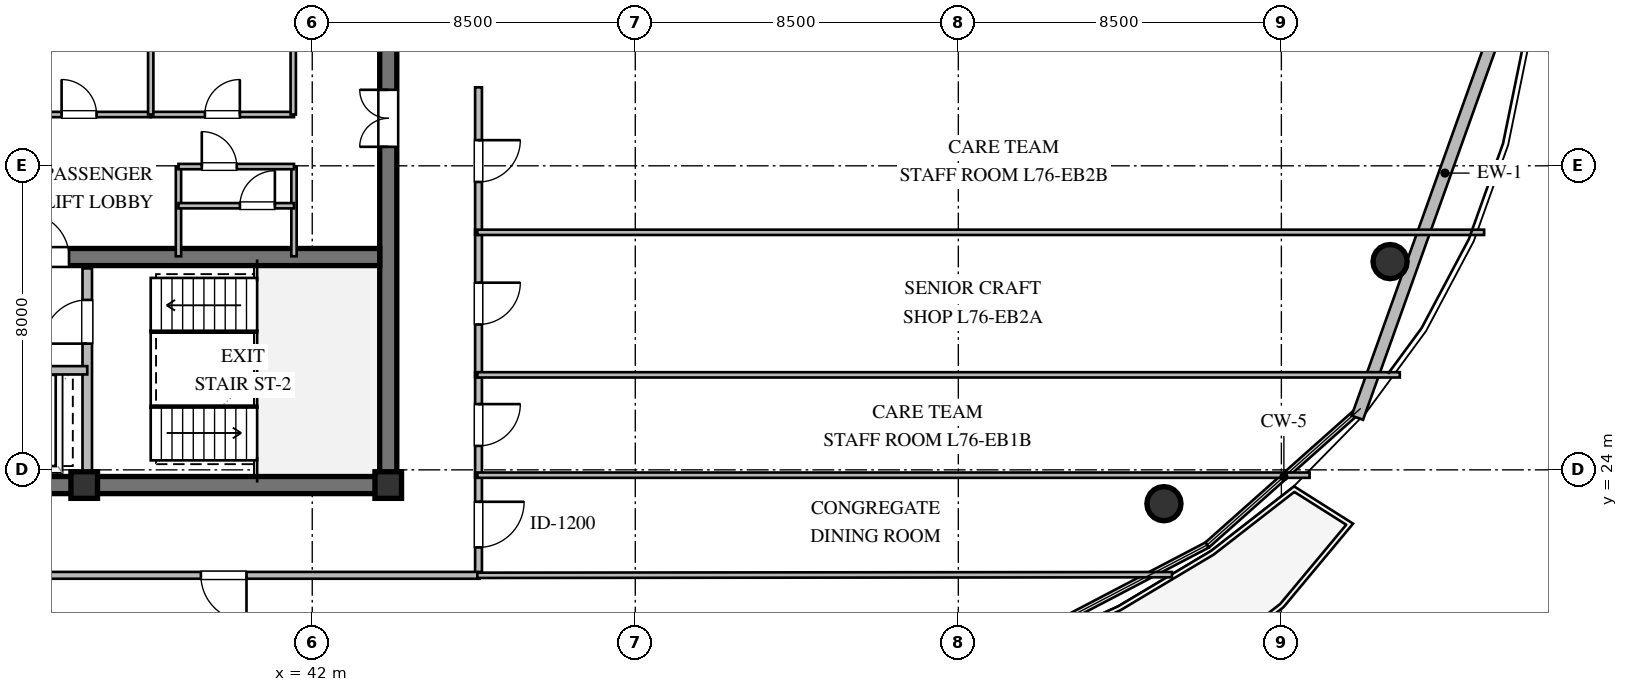
"""IFC4 building model, lengths in metres.
Left out: names, types, materials, properties, quantities, classifications, styles, units other than length and angle.
Written with IfcOpenShell. Run it as: python <this file> out.ifc"""

import sys

from ifc_helpers import new_model, si_unit, direction, frame, frame_2d, origin, origin_2d, place, context, subcontext, project, spatial, rectangle, circle, extrude, element, fill, save


model = new_model("IFC4")
c1 = context("Model", 3, precision=1e-05, world=origin(), true_north=direction((0.0, 1.0)))
c2 = subcontext(c1, "Body", "Model", "MODEL_VIEW")
j1 = project(units=[si_unit("LENGTHUNIT", "METRE"), si_unit("PLANEANGLEUNIT", "RADIAN")], contexts=[c1])
p1 = place(None, origin())
s1 = spatial("IfcSite", under=j1, at=p1, CompositionType="ELEMENT")
p2 = place(p1, origin())
s2 = spatial("IfcBuilding", under=s1, at=p2, CompositionType="ELEMENT")
p3 = place(p2, frame((0.0, 0.0, 289.0)))
s3 = spatial("IfcBuildingStorey", under=s2, at=p3, CompositionType="ELEMENT", Elevation=289.0)
p4 = place(p3, frame((21.775, 23.6, 0.0), z_axis=(0.0, 0.0, 1.0), x_axis=(1.0, 0.0, 0.0)))
e1 = element("IfcWall", 1, at=p4, inside=s3, PredefinedType="SHEAR", context=c2, shape_type="SweptSolid", body=[
    extrude(rectangle(XDim=22.45, YDim=0.45, at=frame_2d((11.225, 0.0))), origin(), (0.0, 0.0, 1.0), 3.48),
])
p5 = place(p3, frame((44.0, 23.825, 0.0), z_axis=(0.0, 0.0, 1.0), x_axis=(0.0, 1.0, 0.0)))
e2 = element("IfcWall", 2, at=p5, inside=s3, PredefinedType="SHEAR", context=c2, shape_type="SweptSolid", body=[
    extrude(rectangle(XDim=12.35, YDim=0.45, at=frame_2d((6.175, 0.0))), origin(), (0.0, 0.0, 1.0), 3.48),
])
p6 = place(p5, frame((8.675, 0.0, 0.0)))
e3 = element("IfcOpeningElement", 3, at=p6, cuts=e2, PredefinedType="OPENING", context=c2, shape_type="SweptSolid", body=[
    extrude(rectangle(XDim=1.5, YDim=2.15, at=frame_2d((0.75, 1.075))), frame((0.0, 0.235, 0.0), z_axis=(0.0, -1.0, 0.0), x_axis=(1.0, 0.0, 0.0)), (0.0, 0.0, 1.0), 0.47),
])
p7 = place(p3, frame((22.225, 29.6, 0.0), z_axis=(0.0, 0.0, 1.0), x_axis=(1.0, 0.0, 0.0)))
e4 = element("IfcWall", 4, at=p7, inside=s3, PredefinedType="SHEAR", context=c2, shape_type="SweptSolid", body=[
    extrude(rectangle(XDim=21.55, YDim=0.45, at=frame_2d((10.775, 0.0))), origin(), (0.0, 0.0, 1.0), 3.48),
])
p8 = place(p7, frame((12.225, 0.0, 0.0)))
e5 = element("IfcOpeningElement", 5, at=p8, cuts=e4, PredefinedType="OPENING", context=c2, shape_type="SweptSolid", body=[
    extrude(rectangle(XDim=1.15, YDim=2.1, at=frame_2d((0.575, 1.05))), frame((0.0, 0.235, 0.0), z_axis=(0.0, -1.0, 0.0), x_axis=(1.0, 0.0, 0.0)), (0.0, 0.0, 1.0), 0.47),
])
for number, where, z_axis, x_axis in (
    (6, (36.0, 23.6, 0.0), (0.0, 0.0, 1.0), (1.0, 0.0, 0.0)),
    (7, (44.0, 23.6, 0.0), (0.0, 0.0, 1.0), (1.0, 0.0, 0.0)),
):
    element("IfcColumn", number, at=place(p3, frame(where, z_axis=z_axis, x_axis=x_axis)), inside=s3, PredefinedType="COLUMN", context=c2, shape_type="SweptSolid", body=[
        extrude(rectangle(XDim=0.7, YDim=0.7, at=origin_2d()), origin(), (0.0, 0.0, 1.0), 3.8),
    ])
for number, where, z_axis, x_axis in (
    (8, (64.41, 23.11, 0.0), (0.0, 0.0, 1.0), (1.0, 0.0, 0.0)),
    (9, (70.36, 29.48, 0.0), (0.0, 0.0, 1.0), (1.0, 0.0, 0.0)),
):
    element("IfcColumn", number, at=place(p3, frame(where, z_axis=z_axis, x_axis=x_axis)), inside=s3, PredefinedType="COLUMN", context=c2, shape_type="SweptSolid", body=[
        extrude(circle(Radius=0.45, at=origin_2d()), origin(), (0.0, 0.0, 1.0), 3.8),
    ])
p9 = place(p3, frame((74.108, 38.245, 0.0), z_axis=(0.0, 0.0, 1.0), x_axis=(-0.337073777429, -0.941478235845, 0.0)))
e10 = element("IfcWall", 10, at=p9, inside=s3, PredefinedType="STANDARD", context=c2, shape_type="SweptSolid", body=[
    extrude(rectangle(XDim=13.673, YDim=0.32, at=frame_2d((6.837, 0.0))), origin(), (0.0, 0.0, 1.0), 3.48),
])
p10 = place(p3, frame((36.08, 23.9, 0.0), z_axis=(0.0, 0.0, 1.0), x_axis=(0.0, 1.0, 0.0)))
e11 = element("IfcWall", 11, at=p10, inside=s3, PredefinedType="SOLIDWALL", context=c2, shape_type="SweptSolid", body=[
    extrude(rectangle(XDim=5.4, YDim=0.25, at=frame_2d((2.7, 0.0))), origin(), (0.0, 0.0, 1.0), 3.48),
])
p11 = place(p10, frame((3.421, 0.0, 0.0)))
e12 = element("IfcOpeningElement", 12, at=p11, cuts=e11, PredefinedType="OPENING", context=c2, shape_type="SweptSolid", body=[
    extrude(rectangle(XDim=1.15, YDim=2.1, at=frame_2d((0.575, 1.05))), frame((0.0, 0.135, 0.0), z_axis=(0.0, -1.0, 0.0), x_axis=(1.0, 0.0, 0.0)), (0.0, 0.0, 1.0), 0.27),
])
p12 = place(p3, frame((29.92, 26.62, 0.0), z_axis=(0.0, 0.0, 1.0), x_axis=(1.0, 0.0, 0.0)))
e13 = element("IfcWall", 13, at=p12, inside=s3, PredefinedType="SOLIDWALL", context=c2, shape_type="SweptSolid", body=[
    extrude(rectangle(XDim=6.16, YDim=0.22, at=frame_2d((3.08, 0.0))), origin(), (0.0, 0.0, 1.0), 3.48),
])
p13 = place(p12, frame((0.99, 0.0, 0.0)))
e14 = element("IfcOpeningElement", 14, at=p13, cuts=e13, PredefinedType="OPENING", context=c2, shape_type="SweptSolid", body=[
    extrude(rectangle(XDim=1.1, YDim=2.1, at=frame_2d((0.55, 1.05))), frame((0.0, 0.12, 0.0), z_axis=(0.0, -1.0, 0.0), x_axis=(1.0, 0.0, 0.0)), (0.0, 0.0, 1.0), 0.24),
])
p14 = place(p12, frame((4.07, 0.0, 0.0)))
e15 = element("IfcOpeningElement", 15, at=p14, cuts=e13, PredefinedType="OPENING", context=c2, shape_type="SweptSolid", body=[
    extrude(rectangle(XDim=1.1, YDim=2.1, at=frame_2d((0.55, 1.05))), frame((0.0, 0.12, 0.0), z_axis=(0.0, -1.0, 0.0), x_axis=(1.0, 0.0, 0.0)), (0.0, 0.0, 1.0), 0.24),
])
p15 = place(p3, frame((33.98, 33.35, 0.0), z_axis=(0.0, 0.0, 1.0), x_axis=(1.0, 0.0, 0.0)))
e16 = element("IfcWall", 16, at=p15, inside=s3, PredefinedType="PARTITIONING", context=c2, shape_type="SweptSolid", body=[
    extrude(rectangle(XDim=3.77, YDim=0.14, at=frame_2d((1.885, 0.0))), origin(), (0.0, 0.0, 1.0), 3.48),
])
p16 = place(p15, frame((1.425, 0.0, 0.0)))
e17 = element("IfcOpeningElement", 17, at=p16, cuts=e16, PredefinedType="OPENING", context=c2, shape_type="SweptSolid", body=[
    extrude(rectangle(XDim=0.92, YDim=2.1, at=frame_2d((0.46, 1.05))), frame((0.0, 0.08, 0.0), z_axis=(0.0, -1.0, 0.0), x_axis=(1.0, 0.0, 0.0)), (0.0, 0.0, 1.0), 0.16),
])
p17 = place(p3, frame((37.75, 33.35, 0.0), z_axis=(0.0, 0.0, 1.0), x_axis=(1.0, 0.0, 0.0)))
e18 = element("IfcWall", 18, at=p17, inside=s3, PredefinedType="PARTITIONING", context=c2, shape_type="SweptSolid", body=[
    extrude(rectangle(XDim=3.77, YDim=0.14, at=frame_2d((1.885, 0.0))), origin(), (0.0, 0.0, 1.0), 3.48),
])
p18 = place(p17, frame((1.425, 0.0, 0.0)))
e19 = element("IfcOpeningElement", 19, at=p18, cuts=e18, PredefinedType="OPENING", context=c2, shape_type="SweptSolid", body=[
    extrude(rectangle(XDim=0.92, YDim=2.1, at=frame_2d((0.46, 1.05))), frame((0.0, 0.08, 0.0), z_axis=(0.0, -1.0, 0.0), x_axis=(1.0, 0.0, 0.0)), (0.0, 0.0, 1.0), 0.16),
])
for number, where, z_axis, x_axis in (
    (20, (37.75, 33.35, 0.0), (0.0, 0.0, 1.0), (0.0, 1.0, 0.0)),
    (21, (41.5, 33.35, 0.0), (0.0, 0.0, 1.0), (0.0, 1.0, 0.0)),
):
    element("IfcWall", number, at=place(p3, frame(where, z_axis=z_axis, x_axis=x_axis)), inside=s3, PredefinedType="PARTITIONING", context=c2, shape_type="SweptSolid", body=[
        extrude(rectangle(XDim=2.75, YDim=0.14, at=frame_2d((1.375, 0.0))), origin(), (0.0, 0.0, 1.0), 3.48),
    ])
for number, where, z_axis, x_axis in (
    (22, (38.48, 29.62, 0.0), (0.0, 0.0, 1.0), (0.0, 1.0, 0.0)),
    (23, (41.52, 29.62, 0.0), (0.0, 0.0, 1.0), (0.0, 1.0, 0.0)),
):
    element("IfcWall", number, at=place(p3, frame(where, z_axis=z_axis, x_axis=x_axis)), inside=s3, PredefinedType="PARTITIONING", context=c2, shape_type="SweptSolid", body=[
        extrude(rectangle(XDim=2.36, YDim=0.14, at=frame_2d((1.18, 0.0))), origin(), (0.0, 0.0, 1.0), 3.48),
    ])
p19 = place(p3, frame((38.48, 30.95, 0.0), z_axis=(0.0, 0.0, 1.0), x_axis=(1.0, 0.0, 0.0)))
e24 = element("IfcWall", 24, at=p19, inside=s3, PredefinedType="PARTITIONING", context=c2, shape_type="SweptSolid", body=[
    extrude(rectangle(XDim=3.04, YDim=0.14, at=frame_2d((1.52, 0.0))), origin(), (0.0, 0.0, 1.0), 3.48),
])
p20 = place(p19, frame((1.617, 0.0, 0.0)))
e25 = element("IfcOpeningElement", 25, at=p20, cuts=e24, PredefinedType="OPENING", context=c2, shape_type="SweptSolid", body=[
    extrude(rectangle(XDim=0.92, YDim=2.1, at=frame_2d((0.46, 1.05))), frame((0.0, 0.08, 0.0), z_axis=(0.0, -1.0, 0.0), x_axis=(1.0, 0.0, 0.0)), (0.0, 0.0, 1.0), 0.16),
])
p21 = place(p3, frame((38.48, 31.98, 0.0), z_axis=(0.0, 0.0, 1.0), x_axis=(1.0, 0.0, 0.0)))
e26 = element("IfcWall", 26, at=p21, inside=s3, PredefinedType="PARTITIONING", context=c2, shape_type="SweptSolid", body=[
    extrude(rectangle(XDim=3.04, YDim=0.14, at=frame_2d((1.52, 0.0))), origin(), (0.0, 0.0, 1.0), 3.48),
])
p22 = place(p21, frame((0.614, 0.0, 0.0)))
e27 = element("IfcOpeningElement", 27, at=p22, cuts=e26, PredefinedType="OPENING", context=c2, shape_type="SweptSolid", body=[
    extrude(rectangle(XDim=0.92, YDim=2.1, at=frame_2d((0.46, 1.05))), frame((0.0, 0.08, 0.0), z_axis=(0.0, -1.0, 0.0), x_axis=(1.0, 0.0, 0.0)), (0.0, 0.0, 1.0), 0.16),
])
p23 = place(p3, frame((46.375, 23.925, 0.0), z_axis=(0.0, 0.0, 1.0), x_axis=(0.0, -1.0, 0.0)))
e28 = element("IfcWall", 28, at=p23, inside=s3, PredefinedType="PARTITIONING", context=c2, shape_type="SweptSolid", body=[
    extrude(rectangle(XDim=2.73, YDim=0.18, at=frame_2d((1.365, 0.0))), origin(), (0.0, 0.0, 1.0), 3.48),
])
p24 = place(p23, frame((0.765, 0.0, 0.0)))
e29 = element("IfcOpeningElement", 29, at=p24, cuts=e28, PredefinedType="OPENING", context=c2, shape_type="SweptSolid", body=[
    extrude(rectangle(XDim=1.2, YDim=2.15, at=frame_2d((0.6, 1.075))), frame((0.0, 0.1, 0.0), z_axis=(0.0, -1.0, 0.0), x_axis=(1.0, 0.0, 0.0)), (0.0, 0.0, 1.0), 0.2),
])
p25 = place(p3, frame((46.375, 26.565, 0.0), z_axis=(0.0, 0.0, 1.0), x_axis=(0.0, -1.0, 0.0)))
e30 = element("IfcWall", 30, at=p25, inside=s3, PredefinedType="PARTITIONING", context=c2, shape_type="SweptSolid", body=[
    extrude(rectangle(XDim=2.77, YDim=0.18, at=frame_2d((1.385, 0.0))), origin(), (0.0, 0.0, 1.0), 3.48),
])
p26 = place(p25, frame((0.835, 0.0, 0.0)))
e31 = element("IfcOpeningElement", 31, at=p26, cuts=e30, PredefinedType="OPENING", context=c2, shape_type="SweptSolid", body=[
    extrude(rectangle(XDim=1.1, YDim=2.1, at=frame_2d((0.55, 1.05))), frame((0.0, 0.1, 0.0), z_axis=(0.0, -1.0, 0.0), x_axis=(1.0, 0.0, 0.0)), (0.0, 0.0, 1.0), 0.2),
])
p27 = place(p3, frame((46.375, 30.315, 0.0), z_axis=(0.0, 0.0, 1.0), x_axis=(0.0, -1.0, 0.0)))
e32 = element("IfcWall", 32, at=p27, inside=s3, PredefinedType="PARTITIONING", context=c2, shape_type="SweptSolid", body=[
    extrude(rectangle(XDim=3.88, YDim=0.18, at=frame_2d((1.94, 0.0))), origin(), (0.0, 0.0, 1.0), 3.48),
])
p28 = place(p27, frame((1.39, 0.0, 0.0)))
e33 = element("IfcOpeningElement", 33, at=p28, cuts=e32, PredefinedType="OPENING", context=c2, shape_type="SweptSolid", body=[
    extrude(rectangle(XDim=1.1, YDim=2.1, at=frame_2d((0.55, 1.05))), frame((0.0, 0.1, 0.0), z_axis=(0.0, -1.0, 0.0), x_axis=(1.0, 0.0, 0.0)), (0.0, 0.0, 1.0), 0.2),
])
p29 = place(p3, frame((46.375, 34.065, 0.0), z_axis=(0.0, 0.0, 1.0), x_axis=(0.0, -1.0, 0.0)))
e34 = element("IfcWall", 34, at=p29, inside=s3, PredefinedType="PARTITIONING", context=c2, shape_type="SweptSolid", body=[
    extrude(rectangle(XDim=3.88, YDim=0.18, at=frame_2d((1.94, 0.0))), origin(), (0.0, 0.0, 1.0), 3.48),
])
p30 = place(p29, frame((1.39, 0.0, 0.0)))
e35 = element("IfcOpeningElement", 35, at=p30, cuts=e34, PredefinedType="OPENING", context=c2, shape_type="SweptSolid", body=[
    extrude(rectangle(XDim=1.1, YDim=2.1, at=frame_2d((0.55, 1.05))), frame((0.0, 0.1, 0.0), z_axis=(0.0, -1.0, 0.0), x_axis=(1.0, 0.0, 0.0)), (0.0, 0.0, 1.0), 0.2),
])
p31 = place(p3, frame((46.405, 21.225, 0.0), z_axis=(0.0, 0.0, 1.0), x_axis=(-1.0, 0.0, 0.0)))
e36 = element("IfcWall", 36, at=p31, inside=s3, PredefinedType="PARTITIONING", context=c2, shape_type="SweptSolid", body=[
    extrude(rectangle(XDim=13.47, YDim=0.18, at=frame_2d((6.735, 0.0))), origin(), (0.0, 0.0, 1.0), 3.116),
])
p32 = place(p31, frame((6.135, 0.0, 0.0)))
e37 = element("IfcOpeningElement", 37, at=p32, cuts=e36, PredefinedType="OPENING", context=c2, shape_type="SweptSolid", body=[
    extrude(rectangle(XDim=1.2, YDim=2.15, at=frame_2d((0.6, 1.075))), frame((0.0, 0.1, 0.0), z_axis=(0.0, -1.0, 0.0), x_axis=(1.0, 0.0, 0.0)), (0.0, 0.0, 1.0), 0.2),
])
p33 = place(p3, frame((46.345, 23.86, 0.0), z_axis=(0.0, 0.0, 1.0), x_axis=(1.0, 0.0, 0.0)))
e38 = element("IfcWall", 38, at=p33, inside=s3, PredefinedType="PARTITIONING", context=c2, shape_type="SweptSolid", body=[
    extrude(rectangle(XDim=21.898, YDim=0.14, at=frame_2d((10.949, 0.0))), origin(), (0.0, 0.0, 1.0), 2.47),
])
p34 = place(p3, frame((64.621, 21.243, 0.0), z_axis=(0.0, 0.0, 1.0), x_axis=(-0.999999524525, -0.000975166183, 0.0)))
e39 = element("IfcWall", 39, at=p34, inside=s3, PredefinedType="PARTITIONING", context=c2, shape_type="SweptSolid", body=[
    extrude(rectangle(XDim=18.276, YDim=0.14, at=frame_2d((9.138, 0.0))), origin(), (0.0, 0.0, 1.0), 3.116),
])
p35 = place(p3, frame((46.345, 26.5, 0.0), z_axis=(0.0, 0.0, 1.0), x_axis=(1.0, 0.0, 0.0)))
e40 = element("IfcWall", 40, at=p35, inside=s3, PredefinedType="PARTITIONING", context=c2, shape_type="SweptSolid", body=[
    extrude(rectangle(XDim=24.271, YDim=0.14, at=frame_2d((12.135, 0.0))), origin(), (0.0, 0.0, 1.0), 2.47),
])
p36 = place(p3, frame((46.345, 30.25, 0.0), z_axis=(0.0, 0.0, 1.0), x_axis=(1.0, 0.0, 0.0)))
e41 = element("IfcWall", 41, at=p36, inside=s3, PredefinedType="PARTITIONING", context=c2, shape_type="SweptSolid", body=[
    extrude(rectangle(XDim=26.49, YDim=0.14, at=frame_2d((13.245, 0.0))), origin(), (0.0, 0.0, 1.0), 3.48),
])
p37 = place(p11, origin())
e42 = element("IfcDoor", 42, at=p37, inside=s3, OperationType="SINGLE_SWING_LEFT", PredefinedType="DOOR", context=c2, shape_type="SweptSolid", body=[
    extrude(rectangle(XDim=1.15, YDim=2.1, at=frame_2d((0.575, 1.05))), frame((0.0, 0.025, 0.0), z_axis=(0.0, -1.0, 0.0), x_axis=(1.0, 0.0, 0.0)), (0.0, 0.0, 1.0), 0.05),
])
fill(e12, e42)
p38 = place(p8, origin())
e43 = element("IfcDoor", 43, at=p38, inside=s3, OperationType="SINGLE_SWING_LEFT", PredefinedType="DOOR", context=c2, shape_type="SweptSolid", body=[
    extrude(rectangle(XDim=1.15, YDim=2.1, at=frame_2d((0.575, 1.05))), frame((0.0, 0.025, 0.0), z_axis=(0.0, -1.0, 0.0), x_axis=(1.0, 0.0, 0.0)), (0.0, 0.0, 1.0), 0.05),
])
fill(e5, e43)
p39 = place(p6, origin())
e44 = element("IfcDoor", 44, at=p39, inside=s3, OperationType="DOUBLE_DOOR_SINGLE_SWING", PredefinedType="DOOR", context=c2, shape_type="SweptSolid", body=[
    extrude(rectangle(XDim=1.5, YDim=2.15, at=frame_2d((0.75, 1.075))), frame((0.0, 0.025, 0.0), z_axis=(0.0, -1.0, 0.0), x_axis=(1.0, 0.0, 0.0)), (0.0, 0.0, 1.0), 0.05),
])
fill(e3, e44)
p40 = place(p16, origin())
e45 = element("IfcDoor", 45, at=p40, inside=s3, OperationType="SINGLE_SWING_LEFT", PredefinedType="DOOR", context=c2, shape_type="SweptSolid", body=[
    extrude(rectangle(XDim=0.92, YDim=2.1, at=frame_2d((0.46, 1.05))), frame((0.0, 0.025, 0.0), z_axis=(0.0, -1.0, 0.0), x_axis=(1.0, 0.0, 0.0)), (0.0, 0.0, 1.0), 0.05),
])
fill(e17, e45)
p41 = place(p18, origin())
e46 = element("IfcDoor", 46, at=p41, inside=s3, OperationType="SINGLE_SWING_RIGHT", PredefinedType="DOOR", context=c2, shape_type="SweptSolid", body=[
    extrude(rectangle(XDim=0.92, YDim=2.1, at=frame_2d((0.46, 1.05))), frame((0.0, 0.025, 0.0), z_axis=(0.0, -1.0, 0.0), x_axis=(1.0, 0.0, 0.0)), (0.0, 0.0, 1.0), 0.05),
])
fill(e19, e46)
p42 = place(p22, origin())
e47 = element("IfcDoor", 47, at=p42, inside=s3, OperationType="SINGLE_SWING_LEFT", PredefinedType="DOOR", context=c2, shape_type="SweptSolid", body=[
    extrude(rectangle(XDim=0.92, YDim=2.1, at=frame_2d((0.46, 1.05))), frame((0.0, 0.025, 0.0), z_axis=(0.0, -1.0, 0.0), x_axis=(1.0, 0.0, 0.0)), (0.0, 0.0, 1.0), 0.05),
])
fill(e27, e47)
p43 = place(p20, origin())
e48 = element("IfcDoor", 48, at=p43, inside=s3, OperationType="SINGLE_SWING_RIGHT", PredefinedType="DOOR", context=c2, shape_type="SweptSolid", body=[
    extrude(rectangle(XDim=0.92, YDim=2.1, at=frame_2d((0.46, 1.05))), frame((0.0, 0.025, 0.0), z_axis=(0.0, -1.0, 0.0), x_axis=(1.0, 0.0, 0.0)), (0.0, 0.0, 1.0), 0.05),
])
fill(e25, e48)
p44 = place(p24, origin())
e49 = element("IfcDoor", 49, at=p44, inside=s3, OperationType="SINGLE_SWING_LEFT", PredefinedType="DOOR", context=c2, shape_type="SweptSolid", body=[
    extrude(rectangle(XDim=1.2, YDim=2.15, at=frame_2d((0.6, 1.075))), frame((0.0, 0.025, 0.0), z_axis=(0.0, -1.0, 0.0), x_axis=(1.0, 0.0, 0.0)), (0.0, 0.0, 1.0), 0.05),
])
fill(e29, e49)
p45 = place(p26, origin())
e50 = element("IfcDoor", 50, at=p45, inside=s3, OperationType="SINGLE_SWING_LEFT", PredefinedType="DOOR", context=c2, shape_type="SweptSolid", body=[
    extrude(rectangle(XDim=1.1, YDim=2.1, at=frame_2d((0.55, 1.05))), frame((0.0, 0.025, 0.0), z_axis=(0.0, -1.0, 0.0), x_axis=(1.0, 0.0, 0.0)), (0.0, 0.0, 1.0), 0.05),
])
fill(e31, e50)
p46 = place(p28, origin())
e51 = element("IfcDoor", 51, at=p46, inside=s3, OperationType="SINGLE_SWING_LEFT", PredefinedType="DOOR", context=c2, shape_type="SweptSolid", body=[
    extrude(rectangle(XDim=1.1, YDim=2.1, at=frame_2d((0.55, 1.05))), frame((0.0, 0.025, 0.0), z_axis=(0.0, -1.0, 0.0), x_axis=(1.0, 0.0, 0.0)), (0.0, 0.0, 1.0), 0.05),
])
fill(e33, e51)
p47 = place(p30, origin())
e52 = element("IfcDoor", 52, at=p47, inside=s3, OperationType="SINGLE_SWING_LEFT", PredefinedType="DOOR", context=c2, shape_type="SweptSolid", body=[
    extrude(rectangle(XDim=1.1, YDim=2.1, at=frame_2d((0.55, 1.05))), frame((0.0, 0.025, 0.0), z_axis=(0.0, -1.0, 0.0), x_axis=(1.0, 0.0, 0.0)), (0.0, 0.0, 1.0), 0.05),
])
fill(e35, e52)
p48 = place(p32, origin())
e53 = element("IfcDoor", 53, at=p48, inside=s3, OperationType="SINGLE_SWING_LEFT", PredefinedType="DOOR", context=c2, shape_type="SweptSolid", body=[
    extrude(rectangle(XDim=1.2, YDim=2.15, at=frame_2d((0.6, 1.075))), frame((0.0, 0.025, 0.0), z_axis=(0.0, -1.0, 0.0), x_axis=(1.0, 0.0, 0.0)), (0.0, 0.0, 1.0), 0.05),
])
fill(e37, e53)
save(model, sys.argv[1])
